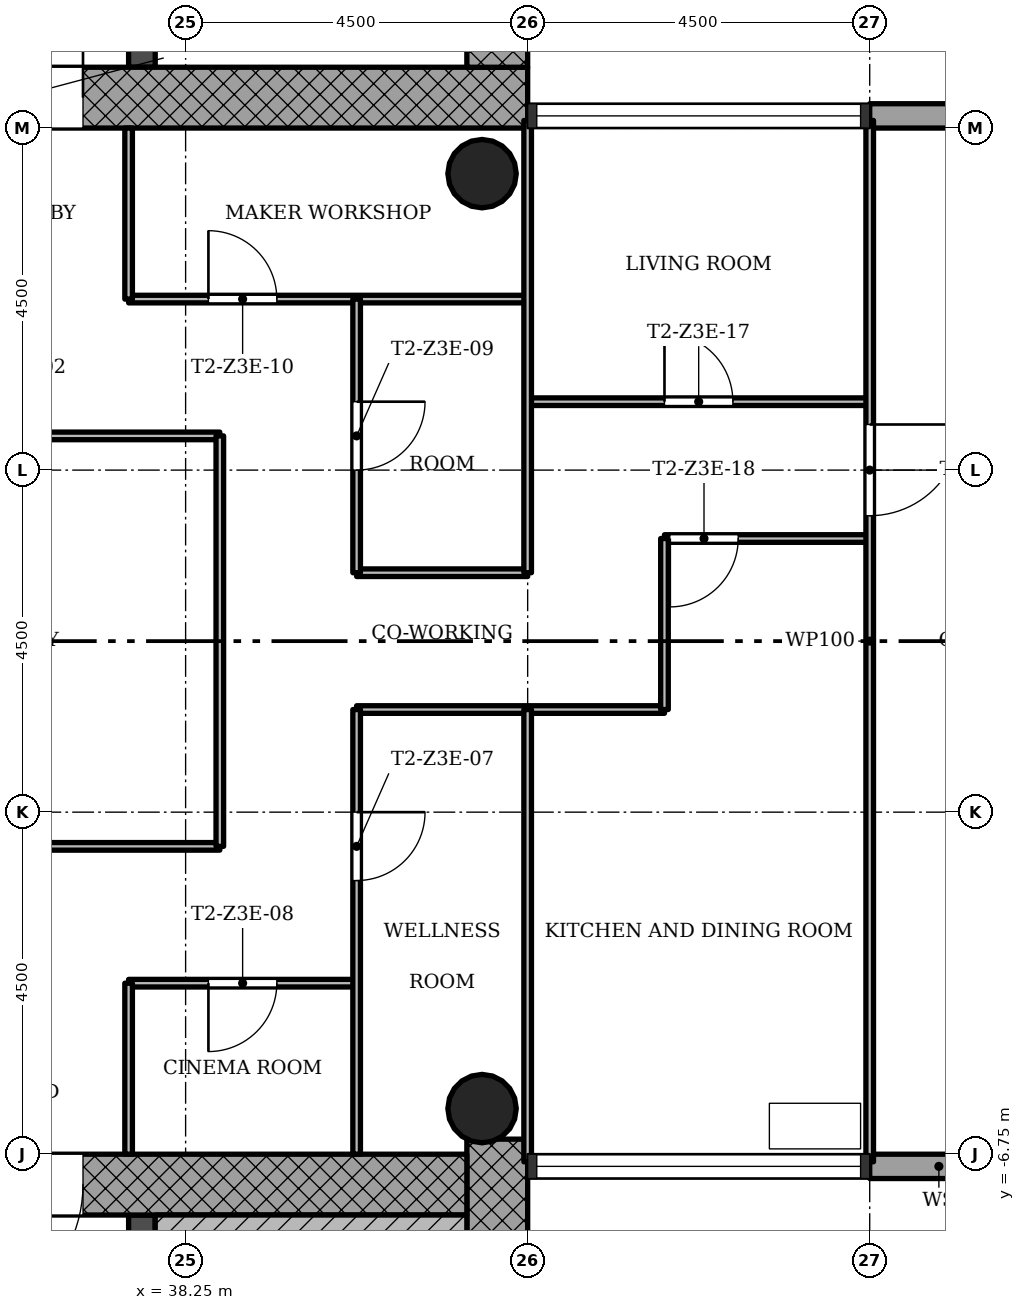
"""IFC4 building model, lengths in metres.
Left out: names, types, materials, properties, quantities, classifications, styles, units other than length and angle.
Written with IfcOpenShell. Run it as: python <this file> out.ifc"""

import sys

from ifc_helpers import new_model, si_unit, direction, frame, frame_2d, origin, origin_2d, place, context, subcontext, project, spatial, rectangle, hollow_circle, extrude, element, fill, save


model = new_model("IFC4")
c1 = context("Model", 3, precision=1e-05, world=origin(), true_north=direction((0.0, 1.0)))
c2 = subcontext(c1, "Body", "Model", "MODEL_VIEW")
j1 = project(units=[si_unit("LENGTHUNIT", "METRE"), si_unit("PLANEANGLEUNIT", "RADIAN")], contexts=[c1])
p1 = place(None, origin())
s1 = spatial("IfcSite", under=j1, at=p1, CompositionType="ELEMENT")
p2 = place(p1, origin())
s2 = spatial("IfcBuilding", under=s1, at=p2, CompositionType="ELEMENT")
p3 = place(p2, frame((0.0, 0.0, 177.9)))
s3 = spatial("IfcBuildingStorey", under=s2, at=p3, CompositionType="ELEMENT", Elevation=177.9)
p4 = place(p3, frame((30.05, 7.15, 0.0), z_axis=(0.0, 0.0, 1.0), x_axis=(1.0, 0.0, 0.0)))
e1 = element("IfcWall", 1, at=p4, inside=s3, PredefinedType="SHEAR", context=c2, shape_type="SweptSolid", body=[
    extrude(rectangle(XDim=12.7, YDim=0.8, at=frame_2d((6.35, 0.0))), origin(), (0.0, 0.0, 1.0), 3.4),
])
p5 = place(p4, frame((5.05, 0.0, 0.0)))
e2 = element("IfcOpeningElement", 2, at=p5, cuts=e1, PredefinedType="OPENING", context=c2, shape_type="SweptSolid", body=[
    extrude(rectangle(XDim=1.8, YDim=2.1, at=frame_2d((0.9, 1.05))), frame((0.0, 0.41, 0.0), z_axis=(0.0, -1.0, 0.0), x_axis=(1.0, 0.0, 0.0)), (0.0, 0.0, 1.0), 0.82),
])
p6 = place(p3, frame((42.35, 7.55, 0.0), z_axis=(0.0, 0.0, 1.0), x_axis=(0.0, 1.0, 0.0)))
e3 = element("IfcWall", 3, at=p6, inside=s3, PredefinedType="SHEAR", context=c2, shape_type="SweptSolid", body=[
    extrude(rectangle(XDim=8.2, YDim=0.8, at=frame_2d((4.1, 0.0))), origin(), (0.0, 0.0, 1.0), 3.4),
])
p7 = place(p3, frame((37.675, 7.55, 0.0), z_axis=(0.0, 0.0, 1.0), x_axis=(0.0, 1.0, 0.0)))
e4 = element("IfcWall", 4, at=p7, inside=s3, PredefinedType="SHEAR", context=c2, shape_type="SweptSolid", body=[
    extrude(rectangle(XDim=7.4, YDim=0.35, at=frame_2d((3.7, 0.0))), origin(), (0.0, 0.0, 1.0), 3.4),
])
p8 = place(p7, frame((0.95, 0.0, 0.0)))
e5 = element("IfcOpeningElement", 5, at=p8, cuts=e4, PredefinedType="OPENING", context=c2, shape_type="SweptSolid", body=[
    extrude(rectangle(XDim=1.1, YDim=2.1, at=frame_2d((0.55, 1.05))), frame((0.0, 0.185, 0.0), z_axis=(0.0, -1.0, 0.0), x_axis=(1.0, 0.0, 0.0)), (0.0, 0.0, 1.0), 0.37),
])
p9 = place(p7, frame((3.15, 0.0, 0.0)))
e6 = element("IfcOpeningElement", 6, at=p9, cuts=e4, PredefinedType="OPENING", context=c2, shape_type="SweptSolid", body=[
    extrude(rectangle(XDim=1.1, YDim=2.1, at=frame_2d((0.55, 1.05))), frame((0.0, 0.185, 0.0), z_axis=(0.0, -1.0, 0.0), x_axis=(1.0, 0.0, 0.0)), (0.0, 0.0, 1.0), 0.37),
])
p10 = place(p7, frame((5.35, 0.0, 0.0)))
e7 = element("IfcOpeningElement", 7, at=p10, cuts=e4, PredefinedType="OPENING", context=c2, shape_type="SweptSolid", body=[
    extrude(rectangle(XDim=1.1, YDim=2.1, at=frame_2d((0.55, 1.05))), frame((0.0, 0.185, 0.0), z_axis=(0.0, -1.0, 0.0), x_axis=(1.0, 0.0, 0.0)), (0.0, 0.0, 1.0), 0.37),
])
p11 = place(p3, frame((42.35, -14.95, 0.0), z_axis=(0.0, 0.0, 1.0), x_axis=(0.0, 1.0, 0.0)))
e8 = element("IfcWall", 8, at=p11, inside=s3, PredefinedType="SHEAR", context=c2, shape_type="SweptSolid", body=[
    extrude(rectangle(XDim=8.398, YDim=0.8, at=frame_2d((4.199, 0.0))), origin(), (0.0, 0.0, 1.0), 3.4),
])
p12 = place(p3, frame((41.95, -7.15, 0.0), z_axis=(0.0, 0.0, 1.0), x_axis=(-1.0, 0.0, 0.0)))
e9 = element("IfcWall", 9, at=p12, inside=s3, PredefinedType="SHEAR", context=c2, shape_type="SweptSolid", body=[
    extrude(rectangle(XDim=12.7, YDim=0.8, at=frame_2d((6.35, 0.0))), origin(), (0.0, 0.0, 1.0), 3.4),
])
p13 = place(p12, frame((5.05, 0.0, 0.0)))
e10 = element("IfcOpeningElement", 10, at=p13, cuts=e9, PredefinedType="OPENING", context=c2, shape_type="SweptSolid", body=[
    extrude(rectangle(XDim=1.8, YDim=2.1, at=frame_2d((0.9, 1.05))), frame((0.0, 0.41, 0.0), z_axis=(0.0, -1.0, 0.0), x_axis=(1.0, 0.0, 0.0)), (0.0, 0.0, 1.0), 0.82),
])
p14 = place(p3, frame((37.675, -14.95, 0.0), z_axis=(0.0, 0.0, 1.0), x_axis=(0.0, 1.0, 0.0)))
e11 = element("IfcWall", 11, at=p14, inside=s3, PredefinedType="SHEAR", context=c2, shape_type="SweptSolid", body=[
    extrude(rectangle(XDim=7.4, YDim=0.35, at=frame_2d((3.7, 0.0))), origin(), (0.0, 0.0, 1.0), 3.4),
])
p15 = place(p14, frame((5.65, 0.0, 0.0)))
e12 = element("IfcOpeningElement", 12, at=p15, cuts=e11, PredefinedType="OPENING", context=c2, shape_type="SweptSolid", body=[
    extrude(rectangle(XDim=0.9, YDim=2.1, at=frame_2d((0.45, 1.05))), frame((0.0, 0.185, 0.0), z_axis=(0.0, -1.0, 0.0), x_axis=(1.0, 0.0, 0.0)), (0.0, 0.0, 1.0), 0.37),
])
for number, where, z_axis, x_axis in (
    (13, (42.15, -6.15, 0.0), (0.0, 0.0, 1.0), (1.0, 0.0, 0.0)),
    (14, (42.15, 6.15, 0.0), (0.0, 0.0, 1.0), (1.0, 0.0, 0.0)),
):
    element("IfcColumn", number, at=place(p3, frame(where, z_axis=z_axis, x_axis=x_axis)), inside=s3, PredefinedType="COLUMN", context=c2, shape_type="SweptSolid", body=[
        extrude(hollow_circle(Radius=0.45, WallThickness=0.032, at=origin_2d()), origin(), (0.0, 0.0, 1.0), 3.4),
    ])
p16 = place(p3, frame((47.25, -6.91, -0.3), z_axis=(0.0, 0.0, 1.0), x_axis=(1.0, 0.0, 0.0)))
e15 = element("IfcWall", 15, at=p16, inside=s3, PredefinedType="STANDARD", context=c2, shape_type="SweptSolid", body=[
    extrude(rectangle(XDim=1.82, YDim=0.32, at=frame_2d((0.91, 0.0))), origin(), (0.0, 0.0, 1.0), 3.4),
])
p17 = place(p3, frame((48.75, 6.91, -0.3), z_axis=(0.0, 0.0, 1.0), x_axis=(-1.0, 0.0, 0.0)))
e16 = element("IfcWall", 16, at=p17, inside=s3, PredefinedType="STANDARD", context=c2, shape_type="SweptSolid", body=[
    extrude(rectangle(XDim=1.5, YDim=0.32, at=frame_2d((0.75, 0.0))), origin(), (0.0, 0.0, 1.0), 3.4),
])
p18 = place(p3, frame((40.5, -4.5, 0.0), z_axis=(0.0, 0.0, 1.0), x_axis=(-1.0, 0.0, 0.0)))
e17 = element("IfcWall", 17, at=p18, inside=s3, PredefinedType="PARTITIONING", context=c2, shape_type="SweptSolid", body=[
    extrude(rectangle(XDim=3.0, YDim=0.1, at=frame_2d((1.5, 0.0))), origin(), (0.0, 0.0, 1.0), 3.0),
])
p19 = place(p18, frame((1.05, 0.0, 0.0)))
e18 = element("IfcOpeningElement", 18, at=p19, cuts=e17, PredefinedType="OPENING", context=c2, shape_type="SweptSolid", body=[
    extrude(rectangle(XDim=0.9, YDim=2.1, at=frame_2d((0.45, 1.05))), frame((0.0, 0.06, 0.0), z_axis=(0.0, -1.0, 0.0), x_axis=(1.0, 0.0, 0.0)), (0.0, 0.0, 1.0), 0.12),
])
p20 = place(p3, frame((38.7, -2.7, 0.0), z_axis=(0.0, 0.0, 1.0), x_axis=(-1.0, 0.0, 0.0)))
e19 = element("IfcWall", 19, at=p20, inside=s3, PredefinedType="PARTITIONING", context=c2, shape_type="SweptSolid", body=[
    extrude(rectangle(XDim=5.4, YDim=0.1, at=frame_2d((2.7, 0.0))), origin(), (0.0, 0.0, 1.0), 3.0),
])
p21 = place(p3, frame((44.55, -0.9, 0.0), z_axis=(0.0, 0.0, 1.0), x_axis=(-1.0, 0.0, 0.0)))
e20 = element("IfcWall", 20, at=p21, inside=s3, PredefinedType="PARTITIONING", context=c2, shape_type="SweptSolid", body=[
    extrude(rectangle(XDim=4.05, YDim=0.1, at=frame_2d((2.025, 0.0))), origin(), (0.0, 0.0, 1.0), 3.0),
])
p22 = place(p3, frame((42.75, 0.9, 0.0), z_axis=(0.0, 0.0, 1.0), x_axis=(-1.0, 0.0, 0.0)))
e21 = element("IfcWall", 21, at=p22, inside=s3, PredefinedType="PARTITIONING", context=c2, shape_type="SweptSolid", body=[
    extrude(rectangle(XDim=2.25, YDim=0.1, at=frame_2d((1.125, 0.0))), origin(), (0.0, 0.0, 1.0), 3.0),
])
p23 = place(p3, frame((47.25, 1.35, 0.0), z_axis=(0.0, 0.0, 1.0), x_axis=(-1.0, 0.0, 0.0)))
e22 = element("IfcWall", 22, at=p23, inside=s3, PredefinedType="PARTITIONING", context=c2, shape_type="SweptSolid", body=[
    extrude(rectangle(XDim=2.7, YDim=0.1, at=frame_2d((1.35, 0.0))), origin(), (0.0, 0.0, 1.0), 3.0),
])
p24 = place(p23, frame((1.73, 0.0, 0.0)))
e23 = element("IfcOpeningElement", 23, at=p24, cuts=e22, PredefinedType="OPENING", context=c2, shape_type="SweptSolid", body=[
    extrude(rectangle(XDim=0.9, YDim=2.1, at=frame_2d((0.45, 1.05))), frame((0.0, 0.06, 0.0), z_axis=(0.0, -1.0, 0.0), x_axis=(1.0, 0.0, 0.0)), (0.0, 0.0, 1.0), 0.12),
])
p25 = place(p3, frame((38.7, 2.7, 0.0), z_axis=(0.0, 0.0, 1.0), x_axis=(-1.0, 0.0, 0.0)))
e24 = element("IfcWall", 24, at=p25, inside=s3, PredefinedType="PARTITIONING", context=c2, shape_type="SweptSolid", body=[
    extrude(rectangle(XDim=5.4, YDim=0.1, at=frame_2d((2.7, 0.0))), origin(), (0.0, 0.0, 1.0), 3.0),
])
p26 = place(p25, frame((2.25, 0.0, 0.0)))
e25 = element("IfcOpeningElement", 25, at=p26, cuts=e24, PredefinedType="OPENING", context=c2, shape_type="SweptSolid", body=[
    extrude(rectangle(XDim=0.9, YDim=2.1, at=frame_2d((0.45, 1.05))), frame((0.0, 0.06, 0.0), z_axis=(0.0, -1.0, 0.0), x_axis=(1.0, 0.0, 0.0)), (0.0, 0.0, 1.0), 0.12),
])
p27 = place(p3, frame((47.25, 3.15, 0.0), z_axis=(0.0, 0.0, 1.0), x_axis=(-1.0, 0.0, 0.0)))
e26 = element("IfcWall", 26, at=p27, inside=s3, PredefinedType="PARTITIONING", context=c2, shape_type="SweptSolid", body=[
    extrude(rectangle(XDim=4.5, YDim=0.1, at=frame_2d((2.25, 0.0))), origin(), (0.0, 0.0, 1.0), 3.0),
])
p28 = place(p27, frame((1.8, 0.0, 0.0)))
e27 = element("IfcOpeningElement", 27, at=p28, cuts=e26, PredefinedType="OPENING", context=c2, shape_type="SweptSolid", body=[
    extrude(rectangle(XDim=0.9, YDim=2.1, at=frame_2d((0.45, 1.05))), frame((0.0, 0.06, 0.0), z_axis=(0.0, -1.0, 0.0), x_axis=(1.0, 0.0, 0.0)), (0.0, 0.0, 1.0), 0.12),
])
p29 = place(p3, frame((42.75, 4.5, 0.0), z_axis=(0.0, 0.0, 1.0), x_axis=(-1.0, 0.0, 0.0)))
e28 = element("IfcWall", 28, at=p29, inside=s3, PredefinedType="PARTITIONING", context=c2, shape_type="SweptSolid", body=[
    extrude(rectangle(XDim=5.25, YDim=0.1, at=frame_2d((2.625, 0.0))), origin(), (0.0, 0.0, 1.0), 3.0),
])
p30 = place(p29, frame((3.3, 0.0, 0.0)))
e29 = element("IfcOpeningElement", 29, at=p30, cuts=e28, PredefinedType="OPENING", context=c2, shape_type="SweptSolid", body=[
    extrude(rectangle(XDim=0.9, YDim=2.1, at=frame_2d((0.45, 1.05))), frame((0.0, 0.06, 0.0), z_axis=(0.0, -1.0, 0.0), x_axis=(1.0, 0.0, 0.0)), (0.0, 0.0, 1.0), 0.12),
])
p31 = place(p3, frame((47.25, -6.85, 0.0), z_axis=(0.0, 0.0, 1.0), x_axis=(0.0, 1.0, 0.0)))
e30 = element("IfcWall", 30, at=p31, inside=s3, PredefinedType="PARTITIONING", context=c2, shape_type="SweptSolid", body=[
    extrude(rectangle(XDim=13.7, YDim=0.1, at=frame_2d((6.85, 0.0))), origin(), (0.0, 0.0, 1.0), 3.0),
])
p32 = place(p31, frame((8.5, 0.0, 0.0)))
e31 = element("IfcOpeningElement", 31, at=p32, cuts=e30, PredefinedType="OPENING", context=c2, shape_type="SweptSolid", body=[
    extrude(rectangle(XDim=1.2, YDim=2.1, at=frame_2d((0.6, 1.05))), frame((0.0, 0.06, 0.0), z_axis=(0.0, -1.0, 0.0), x_axis=(1.0, 0.0, 0.0)), (0.0, 0.0, 1.0), 0.12),
])
p33 = place(p3, frame((44.55, -0.9, 0.0), z_axis=(0.0, 0.0, 1.0), x_axis=(0.0, 1.0, 0.0)))
e32 = element("IfcWall", 32, at=p33, inside=s3, PredefinedType="PARTITIONING", context=c2, shape_type="SweptSolid", body=[
    extrude(rectangle(XDim=2.25, YDim=0.1, at=frame_2d((1.125, 0.0))), origin(), (0.0, 0.0, 1.0), 3.0),
])
for number, where, z_axis, x_axis in (
    (33, (42.75, -6.85, 0.0), (0.0, 0.0, 1.0), (0.0, 1.0, 0.0)),
    (34, (42.75, 0.9, 0.0), (0.0, 0.0, 1.0), (0.0, 1.0, 0.0)),
):
    element("IfcWall", number, at=place(p3, frame(where, z_axis=z_axis, x_axis=x_axis)), inside=s3, PredefinedType="PARTITIONING", context=c2, shape_type="SweptSolid", body=[
        extrude(rectangle(XDim=5.95, YDim=0.1, at=frame_2d((2.975, 0.0))), origin(), (0.0, 0.0, 1.0), 3.0),
    ])
p34 = place(p3, frame((40.5, -6.75, 0.0), z_axis=(0.0, 0.0, 1.0), x_axis=(0.0, 1.0, 0.0)))
e35 = element("IfcWall", 35, at=p34, inside=s3, PredefinedType="PARTITIONING", context=c2, shape_type="SweptSolid", body=[
    extrude(rectangle(XDim=5.85, YDim=0.1, at=frame_2d((2.925, 0.0))), origin(), (0.0, 0.0, 1.0), 3.0),
])
p35 = place(p34, frame((3.6, 0.0, 0.0)))
e36 = element("IfcOpeningElement", 36, at=p35, cuts=e35, PredefinedType="OPENING", context=c2, shape_type="SweptSolid", body=[
    extrude(rectangle(XDim=0.9, YDim=2.1, at=frame_2d((0.45, 1.05))), frame((0.0, 0.06, 0.0), z_axis=(0.0, -1.0, 0.0), x_axis=(1.0, 0.0, 0.0)), (0.0, 0.0, 1.0), 0.12),
])
p36 = place(p3, frame((40.5, 0.9, 0.0), z_axis=(0.0, 0.0, 1.0), x_axis=(0.0, 1.0, 0.0)))
e37 = element("IfcWall", 37, at=p36, inside=s3, PredefinedType="PARTITIONING", context=c2, shape_type="SweptSolid", body=[
    extrude(rectangle(XDim=3.6, YDim=0.1, at=frame_2d((1.8, 0.0))), origin(), (0.0, 0.0, 1.0), 3.0),
])
p37 = place(p36, frame((1.35, 0.0, 0.0)))
e38 = element("IfcOpeningElement", 38, at=p37, cuts=e37, PredefinedType="OPENING", context=c2, shape_type="SweptSolid", body=[
    extrude(rectangle(XDim=0.9, YDim=2.1, at=frame_2d((0.45, 1.05))), frame((0.0, 0.06, 0.0), z_axis=(0.0, -1.0, 0.0), x_axis=(1.0, 0.0, 0.0)), (0.0, 0.0, 1.0), 0.12),
])
p38 = place(p3, frame((38.7, -2.7, 0.0), z_axis=(0.0, 0.0, 1.0), x_axis=(0.0, 1.0, 0.0)))
e39 = element("IfcWall", 39, at=p38, inside=s3, PredefinedType="PARTITIONING", context=c2, shape_type="SweptSolid", body=[
    extrude(rectangle(XDim=5.4, YDim=0.1, at=frame_2d((2.7, 0.0))), origin(), (0.0, 0.0, 1.0), 3.0),
])
for number, where, z_axis, x_axis in (
    (40, (37.5, -6.75, 0.0), (0.0, 0.0, 1.0), (0.0, 1.0, 0.0)),
    (41, (37.5, 4.5, 0.0), (0.0, 0.0, 1.0), (0.0, 1.0, 0.0)),
):
    element("IfcWall", number, at=place(p3, frame(where, z_axis=z_axis, x_axis=x_axis)), inside=s3, PredefinedType="PARTITIONING", context=c2, shape_type="SweptSolid", body=[
        extrude(rectangle(XDim=2.25, YDim=0.1, at=frame_2d((1.125, 0.0))), origin(), (0.0, 0.0, 1.0), 3.0),
    ])
p39 = place(p3, frame((37.85, -7.75, 0.0), z_axis=(0.0, 0.0, 1.0), x_axis=(1.0, 0.0, 0.0)))
e42 = element("IfcWall", 42, at=p39, inside=s3, PredefinedType="SHEAR", context=c2, shape_type="SweptSolid", body=[
    extrude(rectangle(XDim=4.1, YDim=0.4, at=frame_2d((2.05, 0.0))), origin(), (0.0, 0.0, 1.0), 3.4),
])
p40 = place(p35, origin())
e43 = element("IfcDoor", 43, at=p40, inside=s3, OperationType="SINGLE_SWING_RIGHT", PredefinedType="DOOR", context=c2, shape_type="SweptSolid", body=[
    extrude(rectangle(XDim=0.9, YDim=2.1, at=frame_2d((0.45, 1.05))), frame((0.0, 0.025, 0.0), z_axis=(0.0, -1.0, 0.0), x_axis=(1.0, 0.0, 0.0)), (0.0, 0.0, 1.0), 0.05),
])
fill(e36, e43)
p41 = place(p19, origin())
e44 = element("IfcDoor", 44, at=p41, inside=s3, OperationType="SINGLE_SWING_LEFT", PredefinedType="DOOR", context=c2, shape_type="SweptSolid", body=[
    extrude(rectangle(XDim=0.9, YDim=2.1, at=frame_2d((0.45, 1.05))), frame((0.0, 0.025, 0.0), z_axis=(0.0, -1.0, 0.0), x_axis=(1.0, 0.0, 0.0)), (0.0, 0.0, 1.0), 0.05),
])
fill(e18, e44)
p42 = place(p37, origin())
e45 = element("IfcDoor", 45, at=p42, inside=s3, OperationType="SINGLE_SWING_RIGHT", PredefinedType="DOOR", context=c2, shape_type="SweptSolid", body=[
    extrude(rectangle(XDim=0.9, YDim=2.1, at=frame_2d((0.45, 1.05))), frame((0.0, 0.025, 0.0), z_axis=(0.0, -1.0, 0.0), x_axis=(1.0, 0.0, 0.0)), (0.0, 0.0, 1.0), 0.05),
])
fill(e38, e45)
p43 = place(p30, origin())
e46 = element("IfcDoor", 46, at=p43, inside=s3, OperationType="SINGLE_SWING_RIGHT", PredefinedType="DOOR", context=c2, shape_type="SweptSolid", body=[
    extrude(rectangle(XDim=0.9, YDim=2.1, at=frame_2d((0.45, 1.05))), frame((0.0, 0.025, 0.0), z_axis=(0.0, -1.0, 0.0), x_axis=(1.0, 0.0, 0.0)), (0.0, 0.0, 1.0), 0.05),
])
fill(e29, e46)
p44 = place(p28, origin())
e47 = element("IfcDoor", 47, at=p44, inside=s3, OperationType="SINGLE_SWING_RIGHT", PredefinedType="DOOR", context=c2, shape_type="SweptSolid", body=[
    extrude(rectangle(XDim=0.9, YDim=2.1, at=frame_2d((0.45, 1.05))), frame((0.0, 0.025, 0.0), z_axis=(0.0, -1.0, 0.0), x_axis=(1.0, 0.0, 0.0)), (0.0, 0.0, 1.0), 0.05),
])
fill(e27, e47)
p45 = place(p24, origin())
e48 = element("IfcDoor", 48, at=p45, inside=s3, OperationType="SINGLE_SWING_LEFT", PredefinedType="DOOR", context=c2, shape_type="SweptSolid", body=[
    extrude(rectangle(XDim=0.9, YDim=2.1, at=frame_2d((0.45, 1.05))), frame((0.0, 0.025, 0.0), z_axis=(0.0, -1.0, 0.0), x_axis=(1.0, 0.0, 0.0)), (0.0, 0.0, 1.0), 0.05),
])
fill(e23, e48)
p46 = place(p32, origin())
e49 = element("IfcDoor", 49, at=p46, inside=s3, OperationType="SINGLE_SWING_RIGHT", PredefinedType="DOOR", context=c2, shape_type="SweptSolid", body=[
    extrude(rectangle(XDim=1.2, YDim=2.1, at=frame_2d((0.6, 1.05))), frame((0.0, 0.025, 0.0), z_axis=(0.0, -1.0, 0.0), x_axis=(1.0, 0.0, 0.0)), (0.0, 0.0, 1.0), 0.05),
])
fill(e31, e49)
p47 = place(p5, origin())
e50 = element("IfcDoor", 50, at=p47, inside=s3, OperationType="SINGLE_SWING_LEFT", PredefinedType="DOOR", context=c2, shape_type="SweptSolid", body=[
    extrude(rectangle(XDim=1.8, YDim=2.1, at=frame_2d((0.9, 1.05))), frame((0.0, 0.025, 0.0), z_axis=(0.0, -1.0, 0.0), x_axis=(1.0, 0.0, 0.0)), (0.0, 0.0, 1.0), 0.05),
])
fill(e2, e50)
p48 = place(p13, origin())
e51 = element("IfcDoor", 51, at=p48, inside=s3, OperationType="SINGLE_SWING_LEFT", PredefinedType="DOOR", context=c2, shape_type="SweptSolid", body=[
    extrude(rectangle(XDim=1.8, YDim=2.1, at=frame_2d((0.9, 1.05))), frame((0.0, 0.025, 0.0), z_axis=(0.0, -1.0, 0.0), x_axis=(1.0, 0.0, 0.0)), (0.0, 0.0, 1.0), 0.05),
])
fill(e10, e51)
save(model, sys.argv[1])
